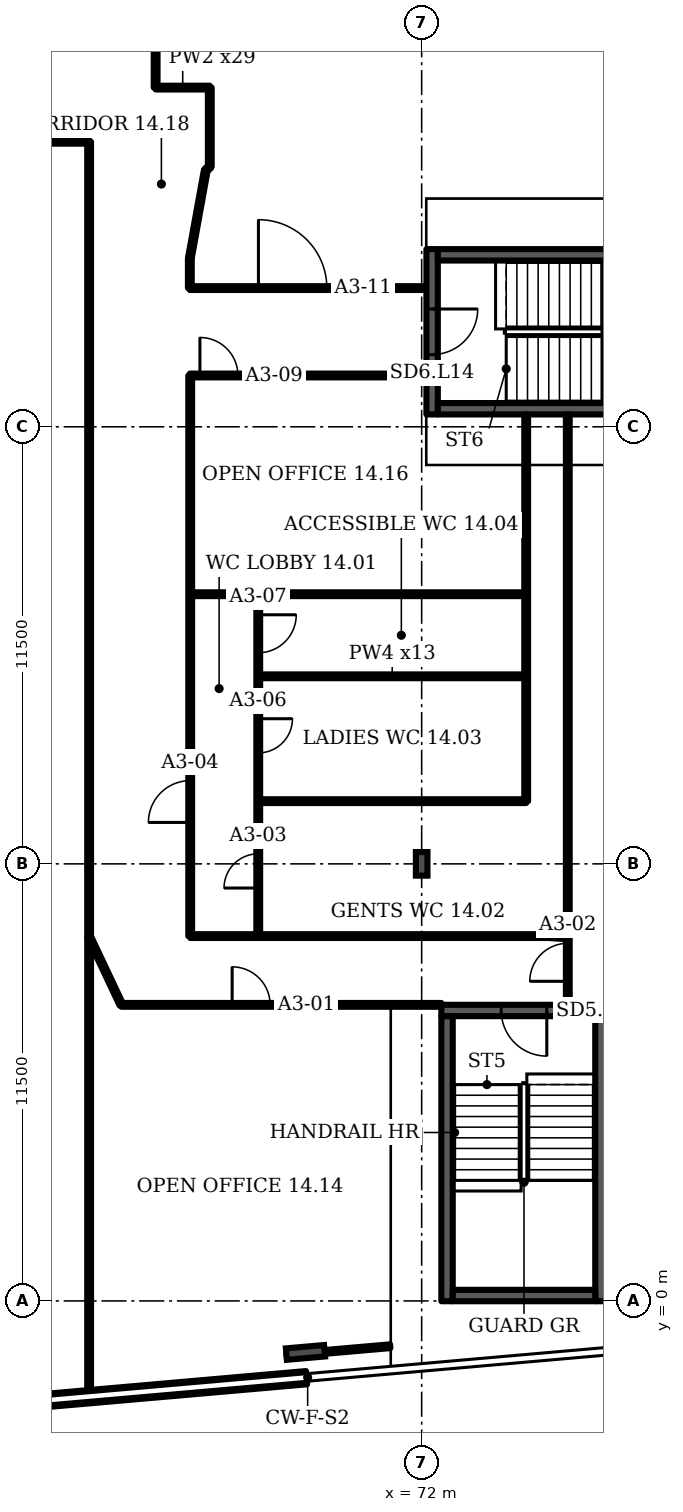
"""IFC4 building model, lengths in metres.
Left out: names, types, materials, properties, quantities, classifications, styles, units other than length and angle.
Written with IfcOpenShell. Run it as: python <this file> out.ifc"""

import sys

from ifc_helpers import new_model, si_unit, direction, frame, frame_2d, origin, origin_2d, place, context, subcontext, project, spatial, rectangle, i_section, extrude, element, fill, save


model = new_model("IFC4")
c1 = context("Model", 3, precision=1e-05, world=origin(), true_north=direction((0.0, 1.0)))
c2 = subcontext(c1, "Body", "Model", "MODEL_VIEW")
j1 = project(units=[si_unit("LENGTHUNIT", "METRE"), si_unit("PLANEANGLEUNIT", "RADIAN")], contexts=[c1])
p1 = place(None, origin())
s1 = spatial("IfcSite", under=j1, at=p1, CompositionType="ELEMENT")
p2 = place(p1, origin())
s2 = spatial("IfcBuilding", under=s1, at=p2, CompositionType="ELEMENT")
p3 = place(p2, frame((0.0, 0.0, 70.3)))
s3 = spatial("IfcBuildingStorey", under=s2, at=p3, CompositionType="ELEMENT", Elevation=70.3)
p4 = place(p3, frame((68.942, -1.355, 0.0), z_axis=(0.0, 0.0, 1.0), x_axis=(0.087156, -0.996198, 0.0)))
e1 = element("IfcColumn", 1, at=p4, inside=s3, PredefinedType="COLUMN", context=c2, shape_type="SweptSolid", body=[
    extrude(i_section(OverallWidth=0.302, OverallDepth=1.008, WebThickness=0.021, FlangeThickness=0.04, FilletRadius=0.03, at=origin_2d()), origin(), (0.0, 0.0, 1.0), 3.6),
])
p5 = place(p3, frame((72.0, 11.5, 0.0), z_axis=(0.0, 0.0, 1.0), x_axis=(1.0, 0.0, 0.0)))
e2 = element("IfcColumn", 2, at=p5, inside=s3, PredefinedType="COLUMN", context=c2, shape_type="SweptSolid", body=[
    extrude(i_section(OverallWidth=0.305, OverallDepth=0.62, WebThickness=0.021, FlangeThickness=0.04, FilletRadius=0.027, at=origin_2d()), origin(), (0.0, 0.0, 1.0), 3.6),
])
p6 = place(p3, frame((46.045, -4.026, 0.0), z_axis=(0.0, 0.0, 1.0), x_axis=(0.99619, 0.087163, 0.0)))
e3 = element("IfcWall", 3, at=p6, inside=s3, PredefinedType="SOLIDWALL", context=c2, shape_type="SweptSolid", body=[
    extrude(rectangle(XDim=23.013, YDim=0.35, at=frame_2d((11.506, 0.0))), origin(), (0.0, 0.0, 1.0), 1.0),
])
p7 = place(p3, frame((72.518, 7.642, 0.0), z_axis=(0.0, 0.0, 1.0), x_axis=(1.0, 0.0, 0.0)))
e4 = element("IfcWall", 4, at=p7, inside=s3, PredefinedType="SHEAR", context=c2, shape_type="SweptSolid", body=[
    extrude(rectangle(XDim=4.35, YDim=0.3, at=frame_2d((2.175, 0.0))), origin(), (0.0, 0.0, 1.0), 3.2),
])
p8 = place(p7, frame((1.575, 0.0, 0.0)))
e5 = element("IfcOpeningElement", 5, at=p8, cuts=e4, PredefinedType="OPENING", context=c2, shape_type="SweptSolid", body=[
    extrude(rectangle(XDim=1.2, YDim=2.1, at=frame_2d((0.6, 1.05))), frame((0.0, 0.16, 0.0), z_axis=(0.0, -1.0, 0.0), x_axis=(1.0, 0.0, 0.0)), (0.0, 0.0, 1.0), 0.32),
])
p9 = place(p3, frame((72.275, 23.325, 0.0), z_axis=(0.0, 0.0, 1.0), x_axis=(0.0, 1.0, 0.0)))
e6 = element("IfcWall", 6, at=p9, inside=s3, PredefinedType="SHEAR", context=c2, shape_type="SweptSolid", body=[
    extrude(rectangle(XDim=4.35, YDim=0.3, at=frame_2d((2.175, 0.0))), origin(), (0.0, 0.0, 1.0), 3.2),
])
p10 = place(p9, frame((1.575, 0.0, 0.0)))
e7 = element("IfcOpeningElement", 7, at=p10, cuts=e6, PredefinedType="OPENING", context=c2, shape_type="SweptSolid", body=[
    extrude(rectangle(XDim=1.2, YDim=2.1, at=frame_2d((0.6, 1.05))), frame((0.0, 0.16, 0.0), z_axis=(0.0, -1.0, 0.0), x_axis=(1.0, 0.0, 0.0)), (0.0, 0.0, 1.0), 0.32),
])
p11 = place(p3, frame((63.25, -2.495, 0.0), z_axis=(0.0, 0.0, 1.0), x_axis=(0.0, 1.0, 0.0)))
e8 = element("IfcWall", 8, at=p11, inside=s3, PredefinedType="PARTITIONING", context=c2, shape_type="SweptSolid", body=[
    extrude(rectangle(XDim=32.995, YDim=0.1, at=frame_2d((16.498, 0.0))), origin(), (0.0, 0.0, 1.0), 2.58),
])
p12 = place(p3, frame((64.1, 7.79, 0.0), z_axis=(0.0, 0.0, 1.0), x_axis=(1.0, 0.0, 0.0)))
e9 = element("IfcWall", 9, at=p12, inside=s3, PredefinedType="PARTITIONING", context=c2, shape_type="SweptSolid", body=[
    extrude(rectangle(XDim=8.417, YDim=0.1, at=frame_2d((4.209, 0.0))), origin(), (0.0, 0.0, 1.0), 3.2),
])
p13 = place(p12, frame((2.913, 0.0, 0.0)))
e10 = element("IfcOpeningElement", 10, at=p13, cuts=e9, PredefinedType="OPENING", context=c2, shape_type="SweptSolid", body=[
    extrude(rectangle(XDim=1.0, YDim=2.1, at=frame_2d((0.5, 1.05))), frame((0.0, 0.06, 0.0), z_axis=(0.0, -1.0, 0.0), x_axis=(1.0, 0.0, 0.0)), (0.0, 0.0, 1.0), 0.12),
])
p14 = place(p3, frame((64.1, 7.79, 0.0), z_axis=(0.0, 0.0, 1.0), x_axis=(-0.428035, 0.903766, 0.0)))
e11 = element("IfcWall", 11, at=p14, inside=s3, PredefinedType="PARTITIONING", context=c2, shape_type="SweptSolid", body=[
    extrude(rectangle(XDim=1.986, YDim=0.1, at=frame_2d((0.993, 0.0))), origin(), (0.0, 0.0, 1.0), 3.2),
])
p15 = place(p3, frame((65.0, 31.925, 0.0), z_axis=(0.0, 0.0, 1.0), x_axis=(0.0, 1.0, 0.0)))
e12 = element("IfcWall", 12, at=p15, inside=s3, PredefinedType="PARTITIONING", context=c2, shape_type="SweptSolid", body=[
    extrude(rectangle(XDim=2.055, YDim=0.1, at=frame_2d((1.027, 0.0))), origin(), (0.0, 0.0, 1.0), 3.2),
])
p16 = place(p3, frame((65.0, 31.925, 0.0), z_axis=(0.0, 0.0, 1.0), x_axis=(1.0, 0.0, 0.0)))
e13 = element("IfcWall", 13, at=p16, inside=s3, PredefinedType="PARTITIONING", context=c2, shape_type="SweptSolid", body=[
    extrude(rectangle(XDim=1.425, YDim=0.1, at=frame_2d((0.712, 0.0))), origin(), (0.0, 0.0, 1.0), 3.2),
])
p17 = place(p3, frame((65.9, 24.35, 0.0), z_axis=(0.0, 0.0, 1.0), x_axis=(1.0, 0.0, 0.0)))
e14 = element("IfcWall", 14, at=p17, inside=s3, PredefinedType="PARTITIONING", context=c2, shape_type="SweptSolid", body=[
    extrude(rectangle(XDim=6.205, YDim=0.1, at=frame_2d((3.103, 0.0))), origin(), (0.0, 0.0, 1.0), 3.2),
])
p18 = place(p17, frame((0.265, 0.0, 0.0)))
e15 = element("IfcOpeningElement", 15, at=p18, cuts=e14, PredefinedType="OPENING", context=c2, shape_type="SweptSolid", body=[
    extrude(rectangle(XDim=1.0, YDim=2.1, at=frame_2d((0.5, 1.05))), frame((0.0, 0.06, 0.0), z_axis=(0.0, -1.0, 0.0), x_axis=(1.0, 0.0, 0.0)), (0.0, 0.0, 1.0), 0.12),
])
p19 = place(p3, frame((65.9, 26.65, 0.0), z_axis=(0.0, 0.0, 1.0), x_axis=(0.0, 1.0, 0.0)))
e16 = element("IfcWall", 16, at=p19, inside=s3, PredefinedType="PARTITIONING", context=c2, shape_type="SweptSolid", body=[
    extrude(rectangle(XDim=0.785, YDim=0.1, at=frame_2d((0.393, 0.0))), origin(), (0.0, 0.0, 1.0), 3.2),
])
p20 = place(p3, frame((65.9, 26.65, 0.0), z_axis=(0.0, 0.0, 1.0), x_axis=(1.0, 0.0, 0.0)))
e17 = element("IfcWall", 17, at=p20, inside=s3, PredefinedType="PARTITIONING", context=c2, shape_type="SweptSolid", body=[
    extrude(rectangle(XDim=6.205, YDim=0.1, at=frame_2d((3.103, 0.0))), origin(), (0.0, 0.0, 1.0), 3.2),
])
p21 = place(p20, frame((1.805, 0.0, 0.0)))
e18 = element("IfcOpeningElement", 18, at=p21, cuts=e17, PredefinedType="OPENING", context=c2, shape_type="SweptSolid", body=[
    extrude(rectangle(XDim=1.8, YDim=2.1, at=frame_2d((0.9, 1.05))), frame((0.0, 0.06, 0.0), z_axis=(0.0, -1.0, 0.0), x_axis=(1.0, 0.0, 0.0)), (0.0, 0.0, 1.0), 0.12),
])
p22 = place(p3, frame((65.9, 27.435, 0.0), z_axis=(0.0, 0.0, 1.0), x_axis=(0.178584, 0.983924, 0.0)))
e19 = element("IfcWall", 19, at=p22, inside=s3, PredefinedType="PARTITIONING", context=c2, shape_type="SweptSolid", body=[
    extrude(rectangle(XDim=2.353, YDim=0.1, at=frame_2d((1.176, 0.0))), origin(), (0.0, 0.0, 1.0), 3.2),
])
p23 = place(p3, frame((65.91, 9.6, 0.0), z_axis=(0.0, 0.0, 1.0), x_axis=(0.0, 1.0, 0.0)))
e20 = element("IfcWall", 20, at=p23, inside=s3, PredefinedType="PARTITIONING", context=c2, shape_type="SweptSolid", body=[
    extrude(rectangle(XDim=14.75, YDim=0.1, at=frame_2d((7.375, 0.0))), origin(), (0.0, 0.0, 1.0), 3.2),
])
p24 = place(p23, frame((2.99, 0.0, 0.0)))
e21 = element("IfcOpeningElement", 21, at=p24, cuts=e20, PredefinedType="OPENING", context=c2, shape_type="SweptSolid", body=[
    extrude(rectangle(XDim=1.1, YDim=2.1, at=frame_2d((0.55, 1.05))), frame((0.0, 0.06, 0.0), z_axis=(0.0, -1.0, 0.0), x_axis=(1.0, 0.0, 0.0)), (0.0, 0.0, 1.0), 0.12),
])
p25 = place(p3, frame((65.91, 9.6, 0.0), z_axis=(0.0, 0.0, 1.0), x_axis=(1.0, 0.0, 0.0)))
e22 = element("IfcWall", 22, at=p25, inside=s3, PredefinedType="PARTITIONING", context=c2, shape_type="SweptSolid", body=[
    extrude(rectangle(XDim=9.485, YDim=0.1, at=frame_2d((4.743, 0.0))), origin(), (0.0, 0.0, 1.0), 3.2),
])
p26 = place(p3, frame((65.91, 18.595, 0.0), z_axis=(0.0, 0.0, 1.0), x_axis=(1.0, 0.0, 0.0)))
e23 = element("IfcWall", 23, at=p26, inside=s3, PredefinedType="PARTITIONING", context=c2, shape_type="SweptSolid", body=[
    extrude(rectangle(XDim=8.84, YDim=0.1, at=frame_2d((4.42, 0.0))), origin(), (0.0, 0.0, 1.0), 3.2),
])
p27 = place(p3, frame((66.32, 29.75, 0.0), z_axis=(0.0, 0.0, 1.0), x_axis=(0.741581, 0.670872, 0.0)))
e24 = element("IfcWall", 24, at=p27, inside=s3, PredefinedType="PARTITIONING", context=c2, shape_type="SweptSolid", body=[
    extrude(rectangle(XDim=0.142, YDim=0.1, at=frame_2d((0.071, 0.0))), origin(), (0.0, 0.0, 1.0), 3.2),
])
p28 = place(p3, frame((66.425, 29.845, 0.0), z_axis=(0.0, 0.0, 1.0), x_axis=(0.0, 1.0, 0.0)))
e25 = element("IfcWall", 25, at=p28, inside=s3, PredefinedType="PARTITIONING", context=c2, shape_type="SweptSolid", body=[
    extrude(rectangle(XDim=2.08, YDim=0.1, at=frame_2d((1.04, 0.0))), origin(), (0.0, 0.0, 1.0), 3.2),
])
p29 = place(p3, frame((67.7, 9.6, 0.0), z_axis=(0.0, 0.0, 1.0), x_axis=(0.0, 1.0, 0.0)))
e26 = element("IfcWall", 26, at=p29, inside=s3, PredefinedType="PARTITIONING", context=c2, shape_type="SweptSolid", body=[
    extrude(rectangle(XDim=8.995, YDim=0.1, at=frame_2d((4.498, 0.0))), origin(), (0.0, 0.0, 1.0), 3.2),
])
p30 = place(p29, frame((1.264, 0.0, 0.0)))
e27 = element("IfcOpeningElement", 27, at=p30, cuts=e26, PredefinedType="OPENING", context=c2, shape_type="SweptSolid", body=[
    extrude(rectangle(XDim=0.9, YDim=2.1, at=frame_2d((0.45, 1.05))), frame((0.0, 0.06, 0.0), z_axis=(0.0, -1.0, 0.0), x_axis=(1.0, 0.0, 0.0)), (0.0, 0.0, 1.0), 0.12),
])
p31 = place(p29, frame((4.819, 0.0, 0.0)))
e28 = element("IfcOpeningElement", 28, at=p31, cuts=e26, PredefinedType="OPENING", context=c2, shape_type="SweptSolid", body=[
    extrude(rectangle(XDim=0.9, YDim=2.1, at=frame_2d((0.45, 1.05))), frame((0.0, 0.06, 0.0), z_axis=(0.0, -1.0, 0.0), x_axis=(1.0, 0.0, 0.0)), (0.0, 0.0, 1.0), 0.12),
])
p32 = place(p29, frame((7.454, 0.0, 0.0)))
e29 = element("IfcOpeningElement", 29, at=p32, cuts=e26, PredefinedType="OPENING", context=c2, shape_type="SweptSolid", body=[
    extrude(rectangle(XDim=1.0, YDim=2.1, at=frame_2d((0.5, 1.05))), frame((0.0, 0.06, 0.0), z_axis=(0.0, -1.0, 0.0), x_axis=(1.0, 0.0, 0.0)), (0.0, 0.0, 1.0), 0.12),
])
for number, where, z_axis, x_axis in (
    (30, (67.7, 13.15, 0.0), (0.0, 0.0, 1.0), (1.0, 0.0, 0.0)),
    (31, (67.7, 16.435, 0.0), (0.0, 0.0, 1.0), (1.0, 0.0, 0.0)),
):
    element("IfcWall", number, at=place(p3, frame(where, z_axis=z_axis, x_axis=x_axis)), inside=s3, PredefinedType="PARTITIONING", context=c2, shape_type="SweptSolid", body=[
        extrude(rectangle(XDim=7.05, YDim=0.1, at=frame_2d((3.525, 0.0))), origin(), (0.0, 0.0, 1.0), 3.2),
    ])
p33 = place(p3, frame((68.445, -1.43, 0.0), z_axis=(0.0, 0.0, 1.0), x_axis=(0.996195, 0.087118, 0.0)))
e32 = element("IfcWall", 32, at=p33, inside=s3, PredefinedType="PARTITIONING", context=c2, shape_type="SweptSolid", body=[
    extrude(rectangle(XDim=2.738, YDim=0.1, at=frame_2d((1.369, 0.0))), origin(), (0.0, 0.0, 1.0), 2.58),
])
p34 = place(p3, frame((74.75, 13.15, 0.0), z_axis=(0.0, 0.0, 1.0), x_axis=(0.0, 1.0, 0.0)))
e33 = element("IfcWall", 33, at=p34, inside=s3, PredefinedType="PARTITIONING", context=c2, shape_type="SweptSolid", body=[
    extrude(rectangle(XDim=10.175, YDim=0.1, at=frame_2d((5.087, 0.0))), origin(), (0.0, 0.0, 1.0), 3.2),
])
p35 = place(p3, frame((75.43, 10.045, 0.0), z_axis=(0.0, 0.0, 1.0), x_axis=(1.0, 0.0, 0.0)))
e34 = element("IfcWall", 34, at=p35, inside=s3, PredefinedType="PARTITIONING", context=c2, shape_type="SweptSolid", body=[
    extrude(rectangle(XDim=0.16, YDim=0.1, at=frame_2d((0.08, 0.0))), origin(), (0.0, 0.0, 1.0), 3.2),
])
p36 = place(p3, frame((75.725, 9.575, 0.0), z_axis=(0.0, 0.0, 1.0), x_axis=(-0.99817, 0.06054, 0.0)))
e35 = element("IfcWall", 35, at=p36, inside=s3, PredefinedType="PARTITIONING", context=c2, shape_type="SweptSolid", body=[
    extrude(rectangle(XDim=0.331, YDim=0.1, at=frame_2d((0.165, 0.0))), origin(), (0.0, 0.0, 1.0), 3.2),
])
p37 = place(p3, frame((75.725, 9.575, 0.0), z_axis=(0.0, 0.0, 1.0), x_axis=(0.0, 1.0, 0.0)))
e36 = element("IfcWall", 36, at=p37, inside=s3, PredefinedType="PARTITIONING", context=c2, shape_type="SweptSolid", body=[
    extrude(rectangle(XDim=0.45, YDim=0.1, at=frame_2d((0.225, 0.0))), origin(), (0.0, 0.0, 1.0), 3.2),
])
p38 = place(p3, frame((75.845, 7.812, 0.0), z_axis=(0.0, 0.0, 1.0), x_axis=(0.0, 1.0, 0.0)))
e37 = element("IfcWall", 37, at=p38, inside=s3, PredefinedType="PARTITIONING", context=c2, shape_type="SweptSolid", body=[
    extrude(rectangle(XDim=15.513, YDim=0.1, at=frame_2d((7.756, 0.0))), origin(), (0.0, 0.0, 1.0), 3.2),
])
p39 = place(p38, frame((0.598, 0.0, 0.0)))
e38 = element("IfcOpeningElement", 38, at=p39, cuts=e37, PredefinedType="OPENING", context=c2, shape_type="SweptSolid", body=[
    extrude(rectangle(XDim=1.0, YDim=2.1, at=frame_2d((0.5, 1.05))), frame((0.0, 0.06, 0.0), z_axis=(0.0, -1.0, 0.0), x_axis=(1.0, 0.0, 0.0)), (0.0, 0.0, 1.0), 0.12),
])
p40 = place(p3, frame((44.15, 30.5, 0.0), z_axis=(0.0, 0.0, 1.0), x_axis=(1.0, 0.0, 0.0)))
e39 = element("IfcWall", 39, at=p40, inside=s3, PredefinedType="PARTITIONING", context=c2, shape_type="SweptSolid", body=[
    extrude(rectangle(XDim=19.1, YDim=0.1, at=frame_2d((9.55, 0.0))), origin(), (0.0, 0.0, 1.0), 3.2),
])
p41 = place(p40, frame((10.07, 0.0, 0.0)))
e40 = element("IfcOpeningElement", 40, at=p41, cuts=e39, PredefinedType="OPENING", context=c2, shape_type="SweptSolid", body=[
    extrude(rectangle(XDim=1.0, YDim=2.1, at=frame_2d((0.5, 1.05))), frame((0.0, 0.06, 0.0), z_axis=(0.0, -1.0, 0.0), x_axis=(1.0, 0.0, 0.0)), (0.0, 0.0, 1.0), 0.12),
])
for number, where, z_axis, x_axis in (
    (41, (72.667, -0.008, 0.0), (0.0, 0.0, 1.0), (0.0, 1.0, 0.0)),
    (42, (76.718, -0.008, 0.0), (0.0, 0.0, 1.0), (0.0, 1.0, 0.0)),
):
    element("IfcWall", number, at=place(p3, frame(where, z_axis=z_axis, x_axis=x_axis)), inside=s3, PredefinedType="SHEAR", context=c2, shape_type="SweptSolid", body=[
        extrude(rectangle(XDim=7.5, YDim=0.3, at=frame_2d((3.75, 0.0))), origin(), (0.0, 0.0, 1.0), 3.2),
    ])
p42 = place(p3, frame((72.817, 0.142, 0.0), z_axis=(0.0, 0.0, 1.0), x_axis=(1.0, 0.0, 0.0)))
e43 = element("IfcWall", 43, at=p42, inside=s3, PredefinedType="SHEAR", context=c2, shape_type="SweptSolid", body=[
    extrude(rectangle(XDim=3.75, YDim=0.3, at=frame_2d((1.875, 0.0))), origin(), (0.0, 0.0, 1.0), 3.2),
])
for number, where, z_axis, x_axis in (
    (44, (72.425, 23.475, 0.0), (0.0, 0.0, 1.0), (1.0, 0.0, 0.0)),
    (45, (72.425, 27.525, 0.0), (0.0, 0.0, 1.0), (1.0, 0.0, 0.0)),
):
    element("IfcWall", number, at=place(p3, frame(where, z_axis=z_axis, x_axis=x_axis)), inside=s3, PredefinedType="SHEAR", context=c2, shape_type="SweptSolid", body=[
        extrude(rectangle(XDim=7.5, YDim=0.3, at=frame_2d((3.75, 0.0))), origin(), (0.0, 0.0, 1.0), 3.2),
    ])
p43 = place(p8, origin())
e46 = element("IfcDoor", 46, at=p43, inside=s3, OperationType="SINGLE_SWING_RIGHT", PredefinedType="DOOR", context=c2, shape_type="SweptSolid", body=[
    extrude(rectangle(XDim=1.2, YDim=2.1, at=frame_2d((0.6, 1.05))), frame((0.0, 0.025, 0.0), z_axis=(0.0, -1.0, 0.0), x_axis=(1.0, 0.0, 0.0)), (0.0, 0.0, 1.0), 0.05),
])
fill(e5, e46)
p44 = place(p10, origin())
e47 = element("IfcDoor", 47, at=p44, inside=s3, OperationType="SINGLE_SWING_RIGHT", PredefinedType="DOOR", context=c2, shape_type="SweptSolid", body=[
    extrude(rectangle(XDim=1.2, YDim=2.1, at=frame_2d((0.6, 1.05))), frame((0.0, 0.025, 0.0), z_axis=(0.0, -1.0, 0.0), x_axis=(1.0, 0.0, 0.0)), (0.0, 0.0, 1.0), 0.05),
])
fill(e7, e47)
p45 = place(p13, origin())
e48 = element("IfcDoor", 48, at=p45, inside=s3, OperationType="SINGLE_SWING_LEFT", PredefinedType="DOOR", context=c2, shape_type="SweptSolid", body=[
    extrude(rectangle(XDim=1.0, YDim=2.1, at=frame_2d((0.5, 1.05))), frame((0.0, 0.025, 0.0), z_axis=(0.0, -1.0, 0.0), x_axis=(1.0, 0.0, 0.0)), (0.0, 0.0, 1.0), 0.05),
])
fill(e10, e48)
p46 = place(p39, origin())
e49 = element("IfcDoor", 49, at=p46, inside=s3, OperationType="SINGLE_SWING_LEFT", PredefinedType="DOOR", context=c2, shape_type="SweptSolid", body=[
    extrude(rectangle(XDim=1.0, YDim=2.1, at=frame_2d((0.5, 1.05))), frame((0.0, 0.025, 0.0), z_axis=(0.0, -1.0, 0.0), x_axis=(1.0, 0.0, 0.0)), (0.0, 0.0, 1.0), 0.05),
])
fill(e38, e49)
p47 = place(p30, origin())
e50 = element("IfcDoor", 50, at=p47, inside=s3, OperationType="SINGLE_SWING_LEFT", PredefinedType="DOOR", context=c2, shape_type="SweptSolid", body=[
    extrude(rectangle(XDim=0.9, YDim=2.1, at=frame_2d((0.45, 1.05))), frame((0.0, 0.025, 0.0), z_axis=(0.0, -1.0, 0.0), x_axis=(1.0, 0.0, 0.0)), (0.0, 0.0, 1.0), 0.05),
])
fill(e27, e50)
p48 = place(p24, origin())
e51 = element("IfcDoor", 51, at=p48, inside=s3, OperationType="SINGLE_SWING_LEFT", PredefinedType="DOOR", context=c2, shape_type="SweptSolid", body=[
    extrude(rectangle(XDim=1.1, YDim=2.1, at=frame_2d((0.55, 1.05))), frame((0.0, 0.025, 0.0), z_axis=(0.0, -1.0, 0.0), x_axis=(1.0, 0.0, 0.0)), (0.0, 0.0, 1.0), 0.05),
])
fill(e21, e51)
p49 = place(p31, origin())
e52 = element("IfcDoor", 52, at=p49, inside=s3, OperationType="SINGLE_SWING_RIGHT", PredefinedType="DOOR", context=c2, shape_type="SweptSolid", body=[
    extrude(rectangle(XDim=0.9, YDim=2.1, at=frame_2d((0.45, 1.05))), frame((0.0, 0.025, 0.0), z_axis=(0.0, -1.0, 0.0), x_axis=(1.0, 0.0, 0.0)), (0.0, 0.0, 1.0), 0.05),
])
fill(e28, e52)
p50 = place(p32, origin())
e53 = element("IfcDoor", 53, at=p50, inside=s3, OperationType="SINGLE_SWING_RIGHT", PredefinedType="DOOR", context=c2, shape_type="SweptSolid", body=[
    extrude(rectangle(XDim=1.0, YDim=2.1, at=frame_2d((0.5, 1.05))), frame((0.0, 0.025, 0.0), z_axis=(0.0, -1.0, 0.0), x_axis=(1.0, 0.0, 0.0)), (0.0, 0.0, 1.0), 0.05),
])
fill(e29, e53)
p51 = place(p18, origin())
e54 = element("IfcDoor", 54, at=p51, inside=s3, OperationType="SINGLE_SWING_LEFT", PredefinedType="DOOR", context=c2, shape_type="SweptSolid", body=[
    extrude(rectangle(XDim=1.0, YDim=2.1, at=frame_2d((0.5, 1.05))), frame((0.0, 0.025, 0.0), z_axis=(0.0, -1.0, 0.0), x_axis=(1.0, 0.0, 0.0)), (0.0, 0.0, 1.0), 0.05),
])
fill(e15, e54)
p52 = place(p21, origin())
e55 = element("IfcDoor", 55, at=p52, inside=s3, OperationType="DOUBLE_DOOR_SINGLE_SWING", PredefinedType="DOOR", context=c2, shape_type="SweptSolid", body=[
    extrude(rectangle(XDim=1.8, YDim=2.1, at=frame_2d((0.9, 1.05))), frame((0.0, 0.025, 0.0), z_axis=(0.0, -1.0, 0.0), x_axis=(1.0, 0.0, 0.0)), (0.0, 0.0, 1.0), 0.05),
])
fill(e18, e55)
save(model, sys.argv[1])
